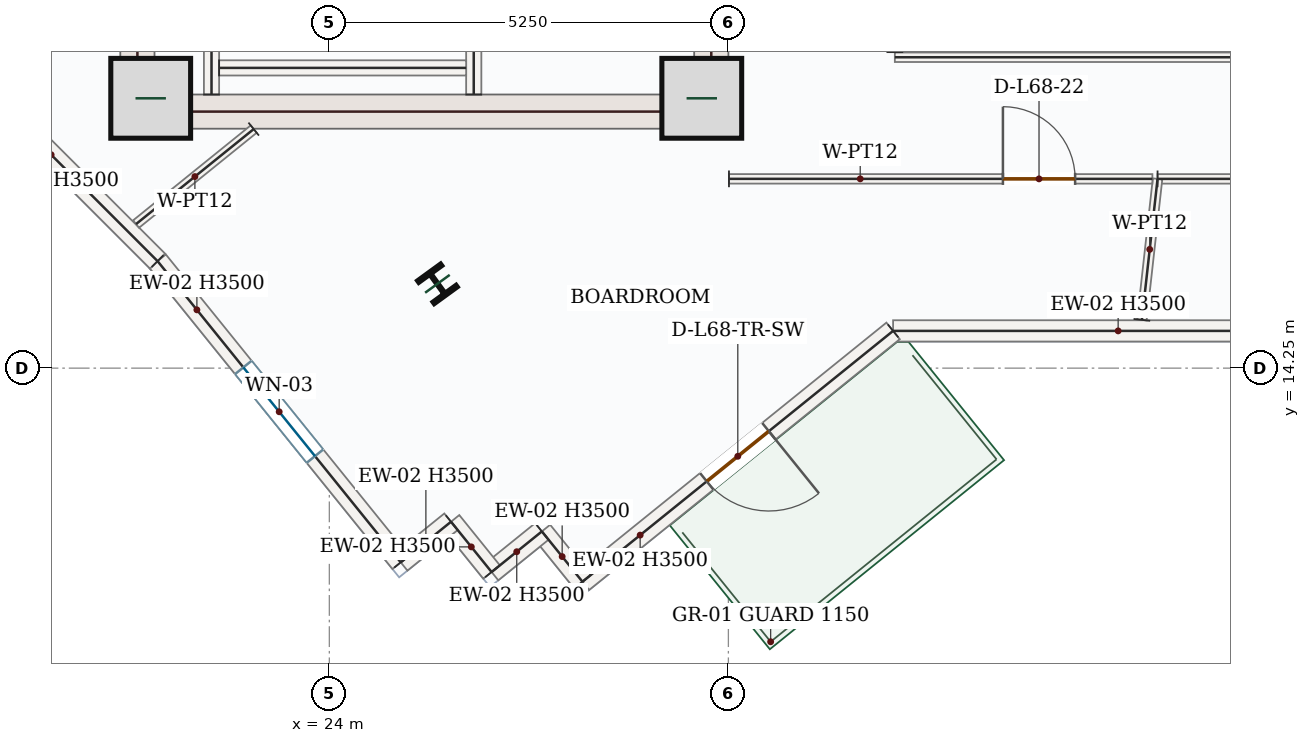
"""IFC4 building model, lengths in metres.
Left out: names, types, materials, properties, quantities, classifications, styles, units other than length and angle.
Written with IfcOpenShell. Run it as: python <this file> out.ifc"""

import sys

from ifc_helpers import new_model, si_unit, direction, frame, frame_2d, origin, origin_2d, place, context, subcontext, project, spatial, rectangle, i_section, extrude, source, transform, mapped, element, fill, save


model = new_model("IFC4")
c1 = context("Model", 3, precision=1e-05, world=origin(), true_north=direction((0.0, 1.0)))
c2 = subcontext(c1, "Body", "Model", "MODEL_VIEW")
j1 = project(units=[si_unit("LENGTHUNIT", "METRE"), si_unit("PLANEANGLEUNIT", "RADIAN")], contexts=[c1])
p1 = place(None, origin())
s1 = spatial("IfcSite", under=j1, at=p1, CompositionType="ELEMENT")
p2 = place(p1, origin())
s2 = spatial("IfcBuilding", under=s1, at=p2, CompositionType="ELEMENT")
p3 = place(p2, frame((0.0, 0.0, 284.1)))
s3 = spatial("IfcBuildingStorey", under=s2, at=p3, CompositionType="ELEMENT", Elevation=284.1)
m1 = source(origin(), c2, "Body", "SweptSolid", [
    extrude(rectangle(XDim=8.55, YDim=0.45, at=frame_2d((4.275, 0.0))), origin(), (0.0, 0.0, 1.0), 3.5),
])
p4 = place(p3, frame((21.475, 17.4, 0.0), z_axis=(0.0, 0.0, 1.0), x_axis=(0.0, 1.0, 0.0)))
e1 = element("IfcWall", 1, at=p4, inside=s3, PredefinedType="SHEAR", context=c2, shape_type="MappedRepresentation", body=[
    mapped(m1, transform((0.0, 0.0, 0.0), x_axis=(1.0, 0.0, 0.0), y_axis=(0.0, 1.0, 0.0), z_axis=(0.0, 0.0, 1.0), scale=1.0)),
])
p5 = place(p3, frame((29.025, 17.4, 0.0), z_axis=(0.0, 0.0, 1.0), x_axis=(0.0, 1.0, 0.0)))
e2 = element("IfcWall", 2, at=p5, inside=s3, PredefinedType="SHEAR", context=c2, shape_type="SweptSolid", body=[
    extrude(rectangle(XDim=8.55, YDim=0.45, at=frame_2d((4.275, 0.0))), origin(), (0.0, 0.0, 1.0), 3.5),
])
p6 = place(p5, frame((6.65, 0.0, 0.0)))
e3 = element("IfcOpeningElement", 3, at=p6, cuts=e2, PredefinedType="OPENING", context=c2, shape_type="SweptSolid", body=[
    extrude(rectangle(XDim=1.1, YDim=2.2, at=frame_2d((0.55, 1.1))), frame((0.0, 0.235, 0.0), z_axis=(0.0, -1.0, 0.0), x_axis=(1.0, 0.0, 0.0)), (0.0, 0.0, 1.0), 0.47),
])
p7 = place(p5, frame((3.15, 0.0, 0.0)))
e4 = element("IfcOpeningElement", 4, at=p7, cuts=e2, PredefinedType="OPENING", context=c2, shape_type="SweptSolid", body=[
    extrude(rectangle(XDim=0.88, YDim=2.1, at=frame_2d((0.44, 1.05))), frame((0.0, 0.235, 0.0), z_axis=(0.0, -1.0, 0.0), x_axis=(1.0, 0.0, 0.0)), (0.0, 0.0, 1.0), 0.47),
])
m2 = source(origin(), c2, "Body", "SweptSolid", [
    extrude(rectangle(XDim=7.1, YDim=0.45, at=frame_2d((3.55, 0.0))), origin(), (0.0, 0.0, 1.0), 3.5),
])
p8 = place(p3, frame((21.7, 17.625, 0.0), z_axis=(0.0, 0.0, 1.0), x_axis=(1.0, 0.0, 0.0)))
e5 = element("IfcWall", 5, at=p8, inside=s3, PredefinedType="SHEAR", context=c2, shape_type="MappedRepresentation", body=[
    mapped(m2, transform((0.0, 0.0, 0.0), x_axis=(1.0, 0.0, 0.0), y_axis=(0.0, 1.0, 0.0), z_axis=(0.0, 0.0, 1.0), scale=1.0)),
])
m3 = source(origin(), c2, "Body", "SweptSolid", [
    extrude(rectangle(XDim=1.05, YDim=1.05, at=origin_2d()), origin(), (0.0, 0.0, 1.0), 3.75),
])
for number, where, z_axis, x_axis in (
    (6, (21.65, 17.8, 0.0), (0.0, 0.0, 1.0), (1.0, 0.0, 0.0)),
    (7, (28.9, 17.8, 0.0), (0.0, 0.0, 1.0), (1.0, 0.0, 0.0)),
):
    element("IfcColumn", number, at=place(p3, frame(where, z_axis=z_axis, x_axis=x_axis)), inside=s3, PredefinedType="COLUMN", context=c2, shape_type="MappedRepresentation", body=[
        mapped(m3, transform((0.0, 0.0, 0.0), x_axis=(1.0, 0.0, 0.0), y_axis=(0.0, 1.0, 0.0), z_axis=(0.0, 0.0, 1.0), scale=1.0)),
    ])
m4 = source(origin(), c2, "Body", "SweptSolid", [
    extrude(i_section(OverallWidth=0.374, OverallDepth=0.372, WebThickness=0.016, FlangeThickness=0.026, FilletRadius=0.018, at=origin_2d()), origin(), (0.0, 0.0, 1.0), 3.75),
])
p9 = place(p3, frame((25.422, 15.359, 0.0), z_axis=(0.0, 0.0, 1.0), x_axis=(0.809016994375, 0.587785252292, 0.0)))
e8 = element("IfcColumn", 8, at=p9, inside=s3, PredefinedType="COLUMN", context=c2, shape_type="MappedRepresentation", body=[
    mapped(m4, transform((0.0, 0.0, 0.0), x_axis=(1.0, 0.0, 0.0), y_axis=(0.0, 1.0, 0.0), z_axis=(0.0, 0.0, 1.0), scale=1.0)),
])
m5 = source(origin(), c2, "Body", "SweptSolid", [
    extrude(rectangle(XDim=5.922, YDim=0.28, at=frame_2d((2.961, 0.0))), origin(), (0.0, 0.0, 1.0), 3.5),
])
p10 = place(p3, frame((37.339, 14.74, 0.0), z_axis=(0.0, 0.0, 1.0), x_axis=(-1.0, 0.0, 0.0)))
e9 = element("IfcWall", 9, at=p10, inside=s3, PredefinedType="SOLIDWALL", context=c2, shape_type="MappedRepresentation", body=[
    mapped(m5, transform((0.0, 0.0, 0.0), x_axis=(1.0, 0.0, 0.0), y_axis=(0.0, 1.0, 0.0), z_axis=(0.0, 0.0, 1.0), scale=1.0)),
])
p11 = place(p3, frame((31.417, 14.74, 0.0), z_axis=(0.0, 0.0, 1.0), x_axis=(-0.778072238875, -0.628174809342, 0.0)))
e10 = element("IfcWall", 10, at=p11, inside=s3, PredefinedType="SOLIDWALL", context=c2, shape_type="SweptSolid", body=[
    extrude(rectangle(XDim=5.253, YDim=0.28, at=frame_2d((2.626, 0.0))), origin(), (0.0, 0.0, 1.0), 3.5),
])
p12 = place(p11, frame((2.101, 0.0, 0.0)))
e11 = element("IfcOpeningElement", 11, at=p12, cuts=e10, PredefinedType="OPENING", context=c2, shape_type="SweptSolid", body=[
    extrude(rectangle(XDim=1.05, YDim=2.15, at=frame_2d((0.525, 1.075))), frame((0.0, 0.15, 0.0), z_axis=(0.0, -1.0, 0.0), x_axis=(1.0, 0.0, 0.0)), (0.0, 0.0, 1.0), 0.3),
])
m6 = source(origin(), c2, "Body", "SweptSolid", [
    extrude(rectangle(XDim=0.85, YDim=0.28, at=frame_2d((0.425, 0.0))), origin(), (0.0, 0.0, 1.0), 3.5),
])
p13 = place(p3, frame((27.33, 11.44, 0.0), z_axis=(0.0, 0.0, 1.0), x_axis=(-0.628156579423, 0.778086956405, 0.0)))
e12 = element("IfcWall", 12, at=p13, inside=s3, PredefinedType="SOLIDWALL", context=c2, shape_type="MappedRepresentation", body=[
    mapped(m6, transform((0.0, 0.0, 0.0), x_axis=(1.0, 0.0, 0.0), y_axis=(0.0, 1.0, 0.0), z_axis=(0.0, 0.0, 1.0), scale=1.0)),
])
m7 = source(origin(), c2, "Body", "SweptSolid", [
    extrude(rectangle(XDim=0.85, YDim=0.28, at=frame_2d((0.425, 0.0))), origin(), (0.0, 0.0, 1.0), 3.5),
])
p14 = place(p3, frame((26.796, 12.102, 0.0), z_axis=(0.0, 0.0, 1.0), x_axis=(-0.777973585776, -0.628296983786, 0.0)))
e13 = element("IfcWall", 13, at=p14, inside=s3, PredefinedType="SOLIDWALL", context=c2, shape_type="MappedRepresentation", body=[
    mapped(m7, transform((0.0, 0.0, 0.0), x_axis=(1.0, 0.0, 0.0), y_axis=(0.0, 1.0, 0.0), z_axis=(0.0, 0.0, 1.0), scale=1.0)),
])
p15 = place(p3, frame((26.135, 11.568, 0.0), z_axis=(0.0, 0.0, 1.0), x_axis=(-0.628330422687, 0.777946579095, 0.0)))
e14 = element("IfcWall", 14, at=p15, inside=s3, PredefinedType="SOLIDWALL", context=c2, shape_type="MappedRepresentation", body=[
    mapped(m6, transform((0.0, 0.0, 0.0), x_axis=(1.0, 0.0, 0.0), y_axis=(0.0, 1.0, 0.0), z_axis=(0.0, 0.0, 1.0), scale=1.0)),
])
p16 = place(p3, frame((25.601, 12.229, 0.0), z_axis=(0.0, 0.0, 1.0), x_axis=(-0.777973585776, -0.628296983786, 0.0)))
e15 = element("IfcWall", 15, at=p16, inside=s3, PredefinedType="SOLIDWALL", context=c2, shape_type="MappedRepresentation", body=[
    mapped(m7, transform((0.0, 0.0, 0.0), x_axis=(1.0, 0.0, 0.0), y_axis=(0.0, 1.0, 0.0), z_axis=(0.0, 0.0, 1.0), scale=1.0)),
])
p17 = place(p3, frame((24.94, 11.695, 0.0), z_axis=(0.0, 0.0, 1.0), x_axis=(-0.628225517447, 0.778031297075, 0.0)))
e16 = element("IfcWall", 16, at=p17, inside=s3, PredefinedType="SOLIDWALL", context=c2, shape_type="SweptSolid", body=[
    extrude(rectangle(XDim=5.093, YDim=0.28, at=frame_2d((2.546, 0.0))), origin(), (0.0, 0.0, 1.0), 3.5),
])
p18 = place(p17, frame((1.796, 0.0, 0.85)))
e17 = element("IfcOpeningElement", 17, at=p18, cuts=e16, PredefinedType="OPENING", context=c2, shape_type="SweptSolid", body=[
    extrude(rectangle(XDim=1.5, YDim=1.5, at=frame_2d((0.75, 0.75))), frame((0.0, 0.15, 0.0), z_axis=(0.0, -1.0, 0.0), x_axis=(1.0, 0.0, 0.0)), (0.0, 0.0, 1.0), 0.3),
])
m8 = source(origin(), c2, "Body", "SweptSolid", [
    extrude(rectangle(XDim=3.96, YDim=0.28, at=frame_2d((1.98, 0.0))), origin(), (0.0, 0.0, 1.0), 3.5),
])
p19 = place(p3, frame((21.74, 15.658, 0.0), z_axis=(0.0, 0.0, 1.0), x_axis=(-0.707106781187, 0.707106781187, 0.0)))
e18 = element("IfcWall", 18, at=p19, inside=s3, PredefinedType="SOLIDWALL", context=c2, shape_type="MappedRepresentation", body=[
    mapped(m8, transform((0.0, 0.0, 0.0), x_axis=(1.0, 0.0, 0.0), y_axis=(0.0, 1.0, 0.0), z_axis=(0.0, 0.0, 1.0), scale=1.0)),
])
m9 = source(origin(), c2, "Body", "SweptSolid", [
    extrude(rectangle(XDim=7.87, YDim=0.2, at=frame_2d((3.935, 0.0))), origin(), (0.0, 0.0, 1.0), 3.5),
])
p20 = place(p3, frame((22.45, 17.85, 0.0), z_axis=(0.0, 0.0, 1.0), x_axis=(0.0, 1.0, 0.0)))
e19 = element("IfcWall", 19, at=p20, inside=s3, PredefinedType="SOLIDWALL", context=c2, shape_type="MappedRepresentation", body=[
    mapped(m9, transform((0.0, 0.0, 0.0), x_axis=(1.0, 0.0, 0.0), y_axis=(0.0, 1.0, 0.0), z_axis=(0.0, 0.0, 1.0), scale=1.0)),
])
p21 = place(p3, frame((25.9, 17.85, 0.0), z_axis=(0.0, 0.0, 1.0), x_axis=(0.0, 1.0, 0.0)))
e20 = element("IfcWall", 20, at=p21, inside=s3, PredefinedType="SOLIDWALL", context=c2, shape_type="SweptSolid", body=[
    extrude(rectangle(XDim=8.0, YDim=0.2, at=frame_2d((4.0, 0.0))), origin(), (0.0, 0.0, 1.0), 3.5),
])
p22 = place(p21, frame((6.2, 0.0, 0.0)))
e21 = element("IfcOpeningElement", 21, at=p22, cuts=e20, PredefinedType="OPENING", context=c2, shape_type="SweptSolid", body=[
    extrude(rectangle(XDim=1.0, YDim=2.15, at=frame_2d((0.5, 1.075))), frame((0.0, 0.11, 0.0), z_axis=(0.0, -1.0, 0.0), x_axis=(1.0, 0.0, 0.0)), (0.0, 0.0, 1.0), 0.22),
])
p23 = place(p21, frame((0.6, 0.0, 0.0)))
e22 = element("IfcOpeningElement", 22, at=p23, cuts=e20, PredefinedType="OPENING", context=c2, shape_type="SweptSolid", body=[
    extrude(rectangle(XDim=0.88, YDim=2.1, at=frame_2d((0.44, 1.05))), frame((0.0, 0.11, 0.0), z_axis=(0.0, -1.0, 0.0), x_axis=(1.0, 0.0, 0.0)), (0.0, 0.0, 1.0), 0.22),
])
m10 = source(origin(), c2, "Body", "SweptSolid", [
    extrude(rectangle(XDim=3.25, YDim=0.2, at=frame_2d((1.625, 0.0))), origin(), (0.0, 0.0, 1.0), 3.5),
])
p24 = place(p3, frame((22.55, 18.2, 0.0), z_axis=(0.0, 0.0, 1.0), x_axis=(1.0, 0.0, 0.0)))
e23 = element("IfcWall", 23, at=p24, inside=s3, PredefinedType="SOLIDWALL", context=c2, shape_type="MappedRepresentation", body=[
    mapped(m10, transform((0.0, 0.0, 0.0), x_axis=(1.0, 0.0, 0.0), y_axis=(0.0, 1.0, 0.0), z_axis=(0.0, 0.0, 1.0), scale=1.0)),
])
m11 = source(origin(), c2, "Body", "SweptSolid", [
    extrude(rectangle(XDim=1.989, YDim=0.125, at=frame_2d((0.995, 0.0))), origin(), (0.0, 0.0, 1.0), 3.5),
])
p25 = place(p3, frame((23.005, 17.395, 0.0), z_axis=(0.0, 0.0, 1.0), x_axis=(-0.778058853423, -0.628191388519, 0.0)))
e24 = element("IfcWall", 24, at=p25, inside=s3, PredefinedType="PARTITIONING", context=c2, shape_type="MappedRepresentation", body=[
    mapped(m11, transform((0.0, 0.0, 0.0), x_axis=(1.0, 0.0, 0.0), y_axis=(0.0, 1.0, 0.0), z_axis=(0.0, 0.0, 1.0), scale=1.0)),
])
p26 = place(p3, frame((34.896, 16.74, 0.0), z_axis=(0.0, 0.0, 1.0), x_axis=(1.0, 0.0, 0.0)))
e25 = element("IfcWall", 25, at=p26, inside=s3, PredefinedType="PARTITIONING", context=c2, shape_type="SweptSolid", body=[
    extrude(rectangle(XDim=6.727, YDim=0.125, at=frame_2d((3.364, 0.0))), origin(), (0.0, 0.0, 1.0), 3.5),
])
p27 = place(p26, frame((1.271, 0.0, 0.0)))
e26 = element("IfcOpeningElement", 26, at=p27, cuts=e25, PredefinedType="OPENING", context=c2, shape_type="SweptSolid", body=[
    extrude(rectangle(XDim=0.95, YDim=2.15, at=frame_2d((0.475, 1.075))), frame((0.0, 0.073, 0.0), z_axis=(0.0, -1.0, 0.0), x_axis=(1.0, 0.0, 0.0)), (0.0, 0.0, 1.0), 0.145),
])
m12 = source(origin(), c2, "Body", "SweptSolid", [
    extrude(rectangle(XDim=1.866, YDim=0.125, at=frame_2d((0.933, 0.0))), origin(), (0.0, 0.0, 1.0), 3.5),
])
p28 = place(p3, frame((34.69, 14.885, 0.0), z_axis=(0.0, 0.0, 1.0), x_axis=(0.110661229882, 0.993858185156, 0.0)))
e27 = element("IfcWall", 27, at=p28, inside=s3, PredefinedType="PARTITIONING", context=c2, shape_type="MappedRepresentation", body=[
    mapped(m12, transform((0.0, 0.0, 0.0), x_axis=(1.0, 0.0, 0.0), y_axis=(0.0, 1.0, 0.0), z_axis=(0.0, 0.0, 1.0), scale=1.0)),
])
p29 = place(p3, frame((29.258, 16.74, 0.0), z_axis=(0.0, 0.0, 1.0), x_axis=(0.99999999904, -4.382505e-05, 0.0)))
e28 = element("IfcWall", 28, at=p29, inside=s3, PredefinedType="PARTITIONING", context=c2, shape_type="SweptSolid", body=[
    extrude(rectangle(XDim=5.571, YDim=0.125, at=frame_2d((2.785, 0.0))), origin(), (0.0, 0.0, 1.0), 3.5),
])
p30 = place(p29, frame((3.604, 0.0, 0.0)))
e29 = element("IfcOpeningElement", 29, at=p30, cuts=e28, PredefinedType="OPENING", context=c2, shape_type="SweptSolid", body=[
    extrude(rectangle(XDim=0.95, YDim=2.15, at=frame_2d((0.475, 1.075))), frame((0.0, 0.073, 0.0), z_axis=(0.0, -1.0, 0.0), x_axis=(1.0, 0.0, 0.0)), (0.0, 0.0, 1.0), 0.145),
])
m13 = source(origin(), c2, "Body", "SweptSolid", [
    extrude(rectangle(XDim=9.12, YDim=0.125, at=frame_2d((4.56, 0.0))), origin(), (0.0, 0.0, 1.0), 3.5),
])
p31 = place(p3, frame((40.56, 18.34, 0.0), z_axis=(0.0, 0.0, 1.0), x_axis=(-1.0, 0.0, 0.0)))
e30 = element("IfcWall", 30, at=p31, inside=s3, PredefinedType="PARTITIONING", context=c2, shape_type="MappedRepresentation", body=[
    mapped(m13, transform((0.0, 0.0, 0.0), x_axis=(1.0, 0.0, 0.0), y_axis=(0.0, 1.0, 0.0), z_axis=(0.0, 0.0, 1.0), scale=1.0)),
])
m14 = source(origin(), c2, "Body", "SweptSolid", [
    extrude(rectangle(XDim=1.05, YDim=2.15, at=frame_2d((0.525, 1.075))), frame((0.0, 0.025, 0.0), z_axis=(0.0, -1.0, 0.0), x_axis=(1.0, 0.0, 0.0)), (0.0, 0.0, 1.0), 0.05),
])
p32 = place(p12, origin())
e31 = element("IfcDoor", 31, at=p32, inside=s3, OperationType="SINGLE_SWING_LEFT", PredefinedType="DOOR", context=c2, shape_type="MappedRepresentation", body=[
    mapped(m14, transform((0.0, 0.0, 0.0), x_axis=(1.0, 0.0, 0.0), y_axis=(0.0, 1.0, 0.0), z_axis=(0.0, 0.0, 1.0), scale=1.0)),
])
fill(e11, e31)
m15 = source(origin(), c2, "Body", "SweptSolid", [
    extrude(rectangle(XDim=1.5, YDim=1.5, at=frame_2d((0.75, 0.75))), frame((0.0, 0.03, 0.0), z_axis=(0.0, -1.0, 0.0), x_axis=(1.0, 0.0, 0.0)), (0.0, 0.0, 1.0), 0.06),
])
p33 = place(p18, origin())
e32 = element("IfcWindow", 32, at=p33, inside=s3, PartitioningType="SINGLE_PANEL", PredefinedType="WINDOW", context=c2, shape_type="MappedRepresentation", body=[
    mapped(m15, transform((0.0, 0.0, 0.0), x_axis=(1.0, 0.0, 0.0), y_axis=(0.0, 1.0, 0.0), z_axis=(0.0, 0.0, 1.0), scale=1.0)),
])
fill(e17, e32)
m16 = source(origin(), c2, "Body", "SweptSolid", [
    extrude(rectangle(XDim=0.95, YDim=2.15, at=frame_2d((0.475, 1.075))), frame((0.0, 0.025, 0.0), z_axis=(0.0, -1.0, 0.0), x_axis=(1.0, 0.0, 0.0)), (0.0, 0.0, 1.0), 0.05),
])
p34 = place(p30, origin())
e33 = element("IfcDoor", 33, at=p34, inside=s3, OperationType="SINGLE_SWING_LEFT", PredefinedType="DOOR", context=c2, shape_type="MappedRepresentation", body=[
    mapped(m16, transform((0.0, 0.0, 0.0), x_axis=(1.0, 0.0, 0.0), y_axis=(0.0, 1.0, 0.0), z_axis=(0.0, 0.0, 1.0), scale=1.0)),
])
fill(e29, e33)
save(model, sys.argv[1])
